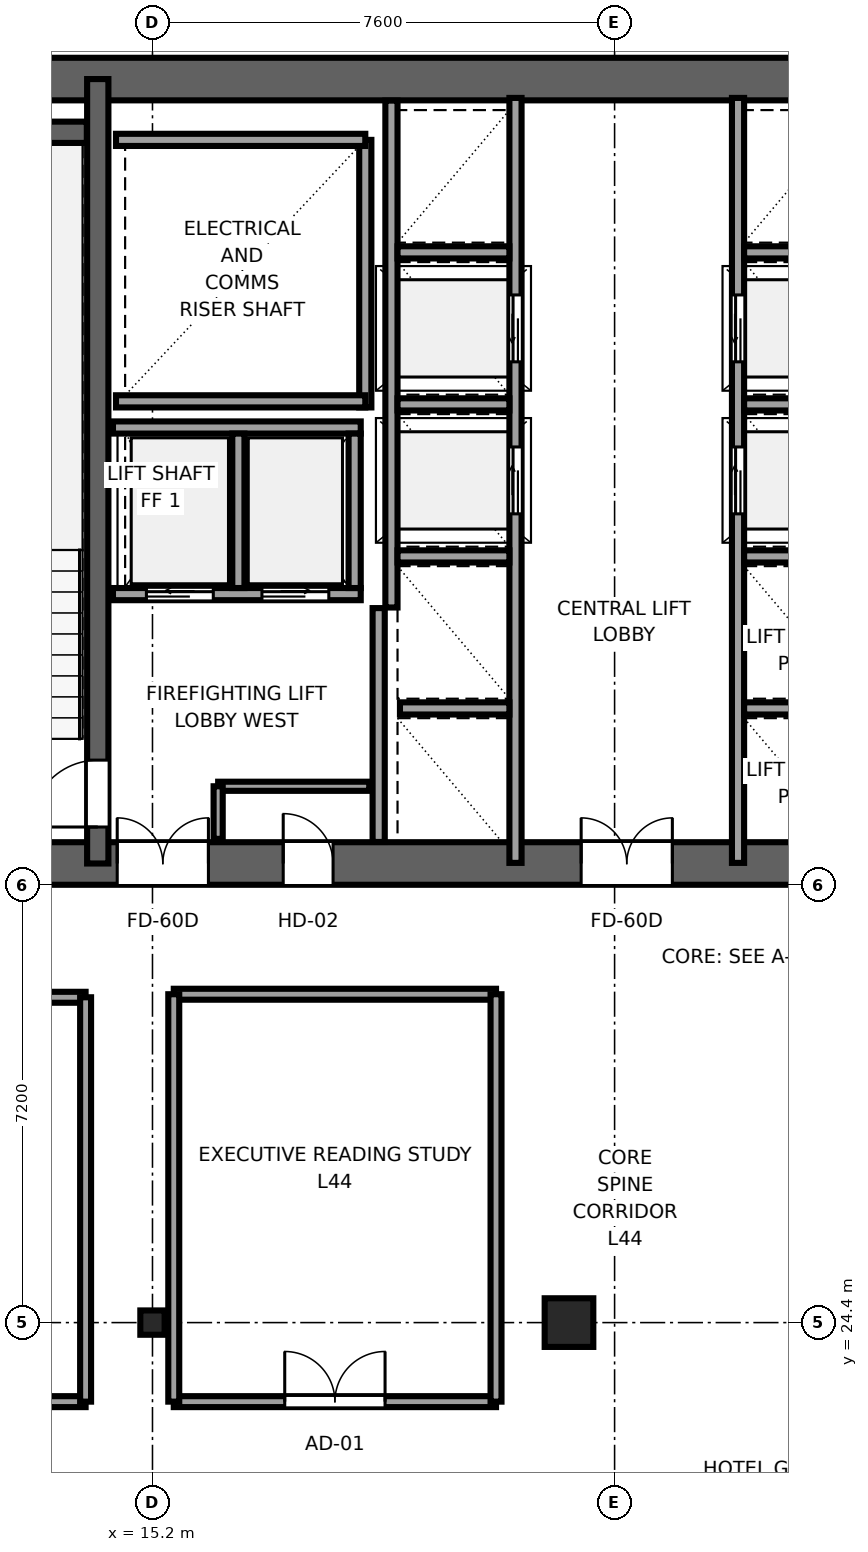
"""IFC4 building model, lengths in metres.
Left out: names, types, materials, properties, quantities, classifications, styles, units other than length and angle.
Written with IfcOpenShell. Run it as: python <this file> out.ifc"""

import sys

from ifc_helpers import new_model, si_unit, direction, frame, frame_2d, origin, origin_2d, place, context, subcontext, project, spatial, rectangle, i_section, extrude, source, transform, mapped, element, fill, save


model = new_model("IFC4")
c1 = context("Model", 3, precision=1e-05, world=origin(), true_north=direction((0.0, 1.0)))
c2 = subcontext(c1, "Body", "Model", "MODEL_VIEW")
j1 = project(units=[si_unit("LENGTHUNIT", "METRE"), si_unit("PLANEANGLEUNIT", "RADIAN")], contexts=[c1])
p1 = place(None, origin())
s1 = spatial("IfcSite", under=j1, at=p1, CompositionType="ELEMENT")
p2 = place(p1, origin())
s2 = spatial("IfcBuilding", under=s1, at=p2, CompositionType="ELEMENT")
p3 = place(p2, frame((0.0, 0.0, 168.35)))
s3 = spatial("IfcBuildingStorey", under=s2, at=p3, CompositionType="ELEMENT", Elevation=168.35)
p4 = place(p3, frame((9.8, 31.95, 0.0), z_axis=(0.0, 0.0, 1.0), x_axis=(1.0, 0.0, 0.0)))
e1 = element("IfcWall", 1, at=p4, inside=s3, PredefinedType="SHEAR", context=c2, shape_type="SweptSolid", body=[
    extrude(rectangle(XDim=26.4, YDim=0.7, at=frame_2d((13.2, 0.0))), origin(), (0.0, 0.0, 1.0), 3.55),
])
p5 = place(p4, frame((6.32, 0.0, 0.0), z_axis=(0.0, 0.0, 1.0), x_axis=(-1.0, 0.0, 0.0)))
e2 = element("IfcOpeningElement", 2, at=p5, cuts=e1, PredefinedType="OPENING", context=c2, shape_type="SweptSolid", body=[
    extrude(rectangle(XDim=1.5, YDim=2.04, at=frame_2d((0.75, 1.02))), frame((0.0, 0.36, 0.0), z_axis=(0.0, -1.0, 0.0), x_axis=(1.0, 0.0, 0.0)), (0.0, 0.0, 1.0), 0.72),
])
p6 = place(p4, frame((13.95, 0.0, 0.0), z_axis=(0.0, 0.0, 1.0), x_axis=(-1.0, 0.0, 0.0)))
e3 = element("IfcOpeningElement", 3, at=p6, cuts=e1, PredefinedType="OPENING", context=c2, shape_type="SweptSolid", body=[
    extrude(rectangle(XDim=1.5, YDim=2.04, at=frame_2d((0.75, 1.02))), frame((0.0, 0.36, 0.0), z_axis=(0.0, -1.0, 0.0), x_axis=(1.0, 0.0, 0.0)), (0.0, 0.0, 1.0), 0.72),
])
p7 = place(p4, frame((21.58, 0.0, 0.0), z_axis=(0.0, 0.0, 1.0), x_axis=(-1.0, 0.0, 0.0)))
e4 = element("IfcOpeningElement", 4, at=p7, cuts=e1, PredefinedType="OPENING", context=c2, shape_type="SweptSolid", body=[
    extrude(rectangle(XDim=1.5, YDim=2.04, at=frame_2d((0.75, 1.02))), frame((0.0, 0.36, 0.0), z_axis=(0.0, -1.0, 0.0), x_axis=(1.0, 0.0, 0.0)), (0.0, 0.0, 1.0), 0.72),
])
p8 = place(p4, frame((8.37, 0.0, 0.0), z_axis=(0.0, 0.0, 1.0), x_axis=(-1.0, 0.0, 0.0)))
e5 = element("IfcOpeningElement", 5, at=p8, cuts=e1, PredefinedType="OPENING", context=c2, shape_type="SweptSolid", body=[
    extrude(rectangle(XDim=0.82, YDim=2.01, at=frame_2d((0.41, 1.005))), frame((0.0, 0.36, 0.0), z_axis=(0.0, -1.0, 0.0), x_axis=(1.0, 0.0, 0.0)), (0.0, 0.0, 1.0), 0.72),
])
p9 = place(p4, frame((18.87, 0.0, 0.0), z_axis=(0.0, 0.0, 1.0), x_axis=(-1.0, 0.0, 0.0)))
e6 = element("IfcOpeningElement", 6, at=p9, cuts=e1, PredefinedType="OPENING", context=c2, shape_type="SweptSolid", body=[
    extrude(rectangle(XDim=0.82, YDim=2.01, at=frame_2d((0.41, 1.005))), frame((0.0, 0.36, 0.0), z_axis=(0.0, -1.0, 0.0), x_axis=(1.0, 0.0, 0.0)), (0.0, 0.0, 1.0), 0.72),
])
p10 = place(p3, frame((9.8, 44.85, 0.0), z_axis=(0.0, 0.0, 1.0), x_axis=(1.0, 0.0, 0.0)))
e7 = element("IfcWall", 7, at=p10, inside=s3, PredefinedType="SHEAR", context=c2, shape_type="SweptSolid", body=[
    extrude(rectangle(XDim=26.4, YDim=0.7, at=frame_2d((13.2, 0.0))), origin(), (0.0, 0.0, 1.0), 3.55),
])
p11 = place(p3, frame((14.3, 31.95, 0.0), z_axis=(0.0, 0.0, 1.0), x_axis=(0.0, 1.0, 0.0)))
e8 = element("IfcWall", 8, at=p11, inside=s3, PredefinedType="SHEAR", context=c2, shape_type="SweptSolid", body=[
    extrude(rectangle(XDim=12.9, YDim=0.35, at=frame_2d((6.45, 0.0))), origin(), (0.0, 0.0, 1.0), 3.55),
])
p12 = place(p11, frame((0.6, 0.0, 0.0)))
e9 = element("IfcOpeningElement", 9, at=p12, cuts=e8, PredefinedType="OPENING", context=c2, shape_type="SweptSolid", body=[
    extrude(rectangle(XDim=1.1, YDim=2.12, at=frame_2d((0.55, 1.06))), frame((0.0, 0.185, 0.0), z_axis=(0.0, -1.0, 0.0), x_axis=(1.0, 0.0, 0.0)), (0.0, 0.0, 1.0), 0.37),
])
p13 = place(p3, frame((10.52, 43.975, 0.0), z_axis=(0.0, 0.0, 1.0), x_axis=(1.0, 0.0, 0.0)))
e10 = element("IfcWall", 10, at=p13, inside=s3, PredefinedType="SHEAR", context=c2, shape_type="SweptSolid", body=[
    extrude(rectangle(XDim=3.6, YDim=0.35, at=frame_2d((1.8, 0.0))), origin(), (0.0, 0.0, 1.0), 3.55),
])
m1 = source(origin(), c2, "Body", "SweptSolid", [
    extrude(i_section(OverallWidth=0.4, OverallDepth=0.4, WebThickness=0.02, FlangeThickness=0.035, at=origin_2d()), origin(), (0.0, 0.0, 1.0), 3.55),
])
p14 = place(p3, frame((15.2, 24.4, 0.0), z_axis=(0.0, 0.0, 1.0), x_axis=(1.0, 0.0, 0.0)))
e11 = element("IfcColumn", 11, at=p14, inside=s3, PredefinedType="COLUMN", context=c2, shape_type="MappedRepresentation", body=[
    mapped(m1, transform((0.0, 0.0, 0.0), x_axis=(1.0, 0.0, 0.0), y_axis=(0.0, 1.0, 0.0), z_axis=(0.0, 0.0, 1.0), scale=1.0)),
])
m2 = source(origin(), c2, "Body", "SweptSolid", [
    extrude(rectangle(XDim=0.8, YDim=0.8, at=origin_2d()), origin(), (0.0, 0.0, 1.0), 3.55),
])
p15 = place(p3, frame((22.05, 24.4, 0.0), z_axis=(0.0, 0.0, 1.0), x_axis=(1.0, 0.0, 0.0)))
e12 = element("IfcColumn", 12, at=p15, inside=s3, PredefinedType="COLUMN", context=c2, shape_type="MappedRepresentation", body=[
    mapped(m2, transform((0.0, 0.0, 0.0), x_axis=(1.0, 0.0, 0.0), y_axis=(0.0, 1.0, 0.0), z_axis=(0.0, 0.0, 1.0), scale=1.0)),
])
p16 = place(p3, frame((18.7, 39.45, 0.0), z_axis=(0.0, 0.0, 1.0), x_axis=(0.0, 1.0, 0.0)))
e13 = element("IfcWall", 13, at=p16, inside=s3, PredefinedType="SOLIDWALL", context=c2, shape_type="SweptSolid", body=[
    extrude(rectangle(XDim=4.4, YDim=0.2, at=frame_2d((2.2, 0.0))), origin(), (0.0, 0.0, 1.0), 3.37),
])
for number, where, z_axis, x_axis in (
    (14, (14.6, 39.55, 0.0), (0.0, 0.0, 1.0), (1.0, 0.0, 0.0)),
    (15, (14.6, 43.85, 0.0), (0.0, 0.0, 1.0), (1.0, 0.0, 0.0)),
):
    element("IfcWall", number, at=place(p3, frame(where, z_axis=z_axis, x_axis=x_axis)), inside=s3, PredefinedType="SOLIDWALL", context=c2, shape_type="SweptSolid", body=[
        extrude(rectangle(XDim=4.1, YDim=0.2, at=frame_2d((2.05, 0.0))), origin(), (0.0, 0.0, 1.0), 3.37),
    ])
p17 = place(p3, frame((18.92, 32.304, 0.0), z_axis=(0.0, 0.0, 1.0), x_axis=(0.0, 1.0, 0.0)))
e16 = element("IfcWall", 16, at=p17, inside=s3, PredefinedType="SOLIDWALL", context=c2, shape_type="SweptSolid", body=[
    extrude(rectangle(XDim=3.846, YDim=0.2, at=frame_2d((1.923, 0.0))), origin(), (0.0, 0.0, 1.0), 3.37),
])
p18 = place(p3, frame((21.17, 31.96, 0.0), z_axis=(0.0, 0.0, 1.0), x_axis=(0.0, 1.0, 0.0)))
e17 = element("IfcWall", 17, at=p18, inside=s3, PredefinedType="SOLIDWALL", context=c2, shape_type="SweptSolid", body=[
    extrude(rectangle(XDim=12.58, YDim=0.2, at=frame_2d((6.29, 0.0))), origin(), (0.0, 0.0, 1.0), 3.37),
])
p19 = place(p18, frame((5.74, 0.0, 0.0)))
e18 = element("IfcOpeningElement", 18, at=p19, cuts=e17, PredefinedType="OPENING", context=c2, shape_type="SweptSolid", body=[
    extrude(rectangle(XDim=1.1, YDim=2.12, at=frame_2d((0.55, 1.06))), frame((0.0, 0.11, 0.0), z_axis=(0.0, -1.0, 0.0), x_axis=(1.0, 0.0, 0.0)), (0.0, 0.0, 1.0), 0.22),
])
p20 = place(p18, frame((8.24, 0.0, 0.0)))
e19 = element("IfcOpeningElement", 19, at=p20, cuts=e17, PredefinedType="OPENING", context=c2, shape_type="SweptSolid", body=[
    extrude(rectangle(XDim=1.1, YDim=2.12, at=frame_2d((0.55, 1.06))), frame((0.0, 0.11, 0.0), z_axis=(0.0, -1.0, 0.0), x_axis=(1.0, 0.0, 0.0)), (0.0, 0.0, 1.0), 0.22),
])
p21 = place(p3, frame((19.13, 36.16, 0.0), z_axis=(0.0, 0.0, 1.0), x_axis=(0.0, 1.0, 0.0)))
e20 = element("IfcWall", 20, at=p21, inside=s3, PredefinedType="SOLIDWALL", context=c2, shape_type="SweptSolid", body=[
    extrude(rectangle(XDim=8.336, YDim=0.2, at=frame_2d((4.168, 0.0))), origin(), (0.0, 0.0, 1.0), 3.37),
])
p22 = place(p3, frame((19.27, 34.5, 0.0), z_axis=(0.0, 0.0, 1.0), x_axis=(1.0, 0.0, 0.0)))
e21 = element("IfcWall", 21, at=p22, inside=s3, PredefinedType="SOLIDWALL", context=c2, shape_type="SweptSolid", body=[
    extrude(rectangle(XDim=1.8, YDim=0.2, at=frame_2d((0.9, 0.0))), origin(), (0.0, 0.0, 1.0), 3.37),
])
for number, where, z_axis, x_axis in (
    (22, (19.23, 37.0, 0.0), (0.0, 0.0, 1.0), (1.0, 0.0, 0.0)),
    (23, (19.23, 39.5, 0.0), (0.0, 0.0, 1.0), (1.0, 0.0, 0.0)),
    (24, (19.23, 42.0, 0.0), (0.0, 0.0, 1.0), (1.0, 0.0, 0.0)),
):
    element("IfcWall", number, at=place(p3, frame(where, z_axis=z_axis, x_axis=x_axis)), inside=s3, PredefinedType="SOLIDWALL", context=c2, shape_type="SweptSolid", body=[
        extrude(rectangle(XDim=1.84, YDim=0.2, at=frame_2d((0.92, 0.0))), origin(), (0.0, 0.0, 1.0), 3.37),
    ])
p23 = place(p3, frame((14.55, 36.38, 0.0), z_axis=(0.0, 0.0, 1.0), x_axis=(1.0, 0.0, 0.0)))
e25 = element("IfcWall", 25, at=p23, inside=s3, PredefinedType="SOLIDWALL", context=c2, shape_type="SweptSolid", body=[
    extrude(rectangle(XDim=4.075, YDim=0.2, at=frame_2d((2.038, 0.0))), origin(), (0.0, 0.0, 1.0), 3.37),
])
p24 = place(p23, frame((0.55, 0.0, 0.0)))
e26 = element("IfcOpeningElement", 26, at=p24, cuts=e25, PredefinedType="OPENING", context=c2, shape_type="SweptSolid", body=[
    extrude(rectangle(XDim=1.1, YDim=2.12, at=frame_2d((0.55, 1.06))), frame((0.0, 0.11, 0.0), z_axis=(0.0, -1.0, 0.0), x_axis=(1.0, 0.0, 0.0)), (0.0, 0.0, 1.0), 0.22),
])
p25 = place(p23, frame((2.45, 0.0, 0.0)))
e27 = element("IfcOpeningElement", 27, at=p25, cuts=e25, PredefinedType="OPENING", context=c2, shape_type="SweptSolid", body=[
    extrude(rectangle(XDim=1.1, YDim=2.12, at=frame_2d((0.55, 1.06))), frame((0.0, 0.11, 0.0), z_axis=(0.0, -1.0, 0.0), x_axis=(1.0, 0.0, 0.0)), (0.0, 0.0, 1.0), 0.22),
])
p26 = place(p3, frame((14.55, 39.12, 0.0), z_axis=(0.0, 0.0, 1.0), x_axis=(1.0, 0.0, 0.0)))
e28 = element("IfcWall", 28, at=p26, inside=s3, PredefinedType="SOLIDWALL", context=c2, shape_type="SweptSolid", body=[
    extrude(rectangle(XDim=4.075, YDim=0.2, at=frame_2d((2.038, 0.0))), origin(), (0.0, 0.0, 1.0), 3.37),
])
for number, where, z_axis, x_axis in (
    (29, (18.525, 36.48, 0.0), (0.0, 0.0, 1.0), (0.0, 1.0, 0.0)),
    (30, (16.613, 36.48, 0.0), (0.0, 0.0, 1.0), (0.0, 1.0, 0.0)),
):
    element("IfcWall", number, at=place(p3, frame(where, z_axis=z_axis, x_axis=x_axis)), inside=s3, PredefinedType="SOLIDWALL", context=c2, shape_type="SweptSolid", body=[
        extrude(rectangle(XDim=2.54, YDim=0.2, at=frame_2d((1.27, 0.0))), origin(), (0.0, 0.0, 1.0), 3.37),
    ])
p27 = place(p3, frame((24.83, 31.96, 0.0), z_axis=(0.0, 0.0, 1.0), x_axis=(0.0, 1.0, 0.0)))
e31 = element("IfcWall", 31, at=p27, inside=s3, PredefinedType="SOLIDWALL", context=c2, shape_type="SweptSolid", body=[
    extrude(rectangle(XDim=12.58, YDim=0.2, at=frame_2d((6.29, 0.0))), origin(), (0.0, 0.0, 1.0), 3.37),
])
p28 = place(p27, frame((5.74, 0.0, 0.0)))
e32 = element("IfcOpeningElement", 32, at=p28, cuts=e31, PredefinedType="OPENING", context=c2, shape_type="SweptSolid", body=[
    extrude(rectangle(XDim=1.1, YDim=2.12, at=frame_2d((0.55, 1.06))), frame((0.0, 0.11, 0.0), z_axis=(0.0, -1.0, 0.0), x_axis=(1.0, 0.0, 0.0)), (0.0, 0.0, 1.0), 0.22),
])
p29 = place(p27, frame((8.24, 0.0, 0.0)))
e33 = element("IfcOpeningElement", 33, at=p29, cuts=e31, PredefinedType="OPENING", context=c2, shape_type="SweptSolid", body=[
    extrude(rectangle(XDim=1.1, YDim=2.12, at=frame_2d((0.55, 1.06))), frame((0.0, 0.11, 0.0), z_axis=(0.0, -1.0, 0.0), x_axis=(1.0, 0.0, 0.0)), (0.0, 0.0, 1.0), 0.22),
])
p30 = place(p3, frame((24.93, 34.5, 0.0), z_axis=(0.0, 0.0, 1.0), x_axis=(1.0, 0.0, 0.0)))
e34 = element("IfcWall", 34, at=p30, inside=s3, PredefinedType="SOLIDWALL", context=c2, shape_type="SweptSolid", body=[
    extrude(rectangle(XDim=1.8, YDim=0.2, at=frame_2d((0.9, 0.0))), origin(), (0.0, 0.0, 1.0), 3.37),
])
for number, where, z_axis, x_axis in (
    (35, (24.93, 37.0, 0.0), (0.0, 0.0, 1.0), (1.0, 0.0, 0.0)),
    (36, (24.93, 39.5, 0.0), (0.0, 0.0, 1.0), (1.0, 0.0, 0.0)),
    (37, (24.93, 42.0, 0.0), (0.0, 0.0, 1.0), (1.0, 0.0, 0.0)),
):
    element("IfcWall", number, at=place(p3, frame(where, z_axis=z_axis, x_axis=x_axis)), inside=s3, PredefinedType="SOLIDWALL", context=c2, shape_type="SweptSolid", body=[
        extrude(rectangle(XDim=1.84, YDim=0.2, at=frame_2d((0.92, 0.0))), origin(), (0.0, 0.0, 1.0), 3.37),
    ])
p31 = place(p3, frame((16.28, 33.22, 0.0), z_axis=(0.0, 0.0, 1.0), x_axis=(1.0, 0.0, 0.0)))
e38 = element("IfcWall", 38, at=p31, inside=s3, PredefinedType="PARTITIONING", context=c2, shape_type="SweptSolid", body=[
    extrude(rectangle(XDim=2.485, YDim=0.15, at=frame_2d((1.242, 0.0))), origin(), (0.0, 0.0, 1.0), 3.37),
])
p32 = place(p3, frame((16.28, 32.355, 0.0), z_axis=(0.0, 0.0, 1.0), x_axis=(0.0, 1.0, 0.0)))
e39 = element("IfcWall", 39, at=p32, inside=s3, PredefinedType="PARTITIONING", context=c2, shape_type="SweptSolid", body=[
    extrude(rectangle(XDim=0.865, YDim=0.15, at=frame_2d((0.433, 0.0))), origin(), (0.0, 0.0, 1.0), 3.37),
])
p33 = place(p3, frame((9.88, 23.1, 0.0), z_axis=(0.0, 0.0, 1.0), x_axis=(1.0, 0.0, 0.0)))
e40 = element("IfcWall", 40, at=p33, inside=s3, PredefinedType="PARTITIONING", context=c2, shape_type="SweptSolid", body=[
    extrude(rectangle(XDim=4.22, YDim=0.18, at=frame_2d((2.11, 0.0))), origin(), (0.0, 0.0, 1.0), 3.37),
])
p34 = place(p33, frame((1.285, 0.0, 0.0)))
e41 = element("IfcOpeningElement", 41, at=p34, cuts=e40, PredefinedType="OPENING", context=c2, shape_type="SweptSolid", body=[
    extrude(rectangle(XDim=1.65, YDim=2.15, at=frame_2d((0.825, 1.075))), frame((0.0, 0.1, 0.0), z_axis=(0.0, -1.0, 0.0), x_axis=(1.0, 0.0, 0.0)), (0.0, 0.0, 1.0), 0.2),
])
p35 = place(p3, frame((9.88, 29.75, 0.0), z_axis=(0.0, 0.0, 1.0), x_axis=(1.0, 0.0, 0.0)))
e42 = element("IfcWall", 42, at=p35, inside=s3, PredefinedType="PARTITIONING", context=c2, shape_type="SweptSolid", body=[
    extrude(rectangle(XDim=4.22, YDim=0.18, at=frame_2d((2.11, 0.0))), origin(), (0.0, 0.0, 1.0), 3.37),
])
p36 = place(p3, frame((14.1, 23.1, 0.0), z_axis=(0.0, 0.0, 1.0), x_axis=(0.0, 1.0, 0.0)))
e43 = element("IfcWall", 43, at=p36, inside=s3, PredefinedType="PARTITIONING", context=c2, shape_type="SweptSolid", body=[
    extrude(rectangle(XDim=6.65, YDim=0.18, at=frame_2d((3.325, 0.0))), origin(), (0.0, 0.0, 1.0), 3.37),
])
p37 = place(p3, frame((15.55, 23.1, 0.0), z_axis=(0.0, 0.0, 1.0), x_axis=(1.0, 0.0, 0.0)))
e44 = element("IfcWall", 44, at=p37, inside=s3, PredefinedType="PARTITIONING", context=c2, shape_type="SweptSolid", body=[
    extrude(rectangle(XDim=5.3, YDim=0.18, at=frame_2d((2.65, 0.0))), origin(), (0.0, 0.0, 1.0), 3.37),
])
p38 = place(p37, frame((1.825, 0.0, 0.0)))
e45 = element("IfcOpeningElement", 45, at=p38, cuts=e44, PredefinedType="OPENING", context=c2, shape_type="SweptSolid", body=[
    extrude(rectangle(XDim=1.65, YDim=2.15, at=frame_2d((0.825, 1.075))), frame((0.0, 0.1, 0.0), z_axis=(0.0, -1.0, 0.0), x_axis=(1.0, 0.0, 0.0)), (0.0, 0.0, 1.0), 0.2),
])
p39 = place(p3, frame((15.55, 29.8, 0.0), z_axis=(0.0, 0.0, 1.0), x_axis=(1.0, 0.0, 0.0)))
e46 = element("IfcWall", 46, at=p39, inside=s3, PredefinedType="PARTITIONING", context=c2, shape_type="SweptSolid", body=[
    extrude(rectangle(XDim=5.3, YDim=0.18, at=frame_2d((2.65, 0.0))), origin(), (0.0, 0.0, 1.0), 3.37),
])
for number, where, z_axis, x_axis in (
    (47, (15.55, 23.1, 0.0), (0.0, 0.0, 1.0), (0.0, 1.0, 0.0)),
    (48, (20.85, 23.1, 0.0), (0.0, 0.0, 1.0), (0.0, 1.0, 0.0)),
):
    element("IfcWall", number, at=place(p3, frame(where, z_axis=z_axis, x_axis=x_axis)), inside=s3, PredefinedType="PARTITIONING", context=c2, shape_type="SweptSolid", body=[
        extrude(rectangle(XDim=6.7, YDim=0.18, at=frame_2d((3.35, 0.0))), origin(), (0.0, 0.0, 1.0), 3.37),
    ])
m3 = source(origin(), c2, "Body", "SweptSolid", [
    extrude(rectangle(XDim=1.1, YDim=2.12, at=frame_2d((0.55, 1.06))), frame((0.0, 0.025, 0.0), z_axis=(0.0, -1.0, 0.0), x_axis=(1.0, 0.0, 0.0)), (0.0, 0.0, 1.0), 0.05),
])
p40 = place(p12, origin())
e49 = element("IfcDoor", 49, at=p40, inside=s3, OperationType="SINGLE_SWING_LEFT", PredefinedType="DOOR", context=c2, shape_type="MappedRepresentation", body=[
    mapped(m3, transform((0.0, 0.0, 0.0), x_axis=(1.0, 0.0, 0.0), y_axis=(0.0, 1.0, 0.0), z_axis=(0.0, 0.0, 1.0), scale=1.0)),
])
fill(e9, e49)
m4 = source(origin(), c2, "Body", "SweptSolid", [
    extrude(rectangle(XDim=1.5, YDim=2.04, at=frame_2d((0.75, 1.02))), frame((0.0, 0.025, 0.0), z_axis=(0.0, -1.0, 0.0), x_axis=(1.0, 0.0, 0.0)), (0.0, 0.0, 1.0), 0.05),
])
p41 = place(p5, origin())
e50 = element("IfcDoor", 50, at=p41, inside=s3, OperationType="DOUBLE_DOOR_SINGLE_SWING", PredefinedType="DOOR", context=c2, shape_type="MappedRepresentation", body=[
    mapped(m4, transform((0.0, 0.0, 0.0), x_axis=(1.0, 0.0, 0.0), y_axis=(0.0, 1.0, 0.0), z_axis=(0.0, 0.0, 1.0), scale=1.0)),
])
fill(e2, e50)
p42 = place(p6, origin())
e51 = element("IfcDoor", 51, at=p42, inside=s3, OperationType="DOUBLE_DOOR_SINGLE_SWING", PredefinedType="DOOR", context=c2, shape_type="MappedRepresentation", body=[
    mapped(m4, transform((0.0, 0.0, 0.0), x_axis=(1.0, 0.0, 0.0), y_axis=(0.0, 1.0, 0.0), z_axis=(0.0, 0.0, 1.0), scale=1.0)),
])
fill(e3, e51)
m5 = source(origin(), c2, "Body", "SweptSolid", [
    extrude(rectangle(XDim=0.82, YDim=2.01, at=frame_2d((0.41, 1.005))), frame((0.0, 0.025, 0.0), z_axis=(0.0, -1.0, 0.0), x_axis=(1.0, 0.0, 0.0)), (0.0, 0.0, 1.0), 0.05),
])
p43 = place(p8, origin())
e52 = element("IfcDoor", 52, at=p43, inside=s3, OperationType="SINGLE_SWING_LEFT", PredefinedType="DOOR", context=c2, shape_type="MappedRepresentation", body=[
    mapped(m5, transform((0.0, 0.0, 0.0), x_axis=(1.0, 0.0, 0.0), y_axis=(0.0, 1.0, 0.0), z_axis=(0.0, 0.0, 1.0), scale=1.0)),
])
fill(e5, e52)
m6 = source(origin(), c2, "Body", "SweptSolid", [
    extrude(rectangle(XDim=1.1, YDim=2.12, at=frame_2d((0.55, 1.06))), frame((0.0, 0.025, 0.0), z_axis=(0.0, -1.0, 0.0), x_axis=(1.0, 0.0, 0.0)), (0.0, 0.0, 1.0), 0.05),
])
p44 = place(p19, origin())
e53 = element("IfcDoor", 53, at=p44, inside=s3, OperationType="SLIDING_TO_RIGHT", PredefinedType="DOOR", context=c2, shape_type="MappedRepresentation", body=[
    mapped(m6, transform((0.0, 0.0, 0.0), x_axis=(1.0, 0.0, 0.0), y_axis=(0.0, 1.0, 0.0), z_axis=(0.0, 0.0, 1.0), scale=1.0)),
])
fill(e18, e53)
p45 = place(p20, origin())
e54 = element("IfcDoor", 54, at=p45, inside=s3, OperationType="SLIDING_TO_LEFT", PredefinedType="DOOR", context=c2, shape_type="MappedRepresentation", body=[
    mapped(m6, transform((0.0, 0.0, 0.0), x_axis=(1.0, 0.0, 0.0), y_axis=(0.0, 1.0, 0.0), z_axis=(0.0, 0.0, 1.0), scale=1.0)),
])
fill(e19, e54)
p46 = place(p24, origin())
e55 = element("IfcDoor", 55, at=p46, inside=s3, OperationType="SLIDING_TO_LEFT", PredefinedType="DOOR", context=c2, shape_type="MappedRepresentation", body=[
    mapped(m6, transform((0.0, 0.0, 0.0), x_axis=(1.0, 0.0, 0.0), y_axis=(0.0, 1.0, 0.0), z_axis=(0.0, 0.0, 1.0), scale=1.0)),
])
fill(e26, e55)
p47 = place(p25, origin())
e56 = element("IfcDoor", 56, at=p47, inside=s3, OperationType="SLIDING_TO_RIGHT", PredefinedType="DOOR", context=c2, shape_type="MappedRepresentation", body=[
    mapped(m6, transform((0.0, 0.0, 0.0), x_axis=(1.0, 0.0, 0.0), y_axis=(0.0, 1.0, 0.0), z_axis=(0.0, 0.0, 1.0), scale=1.0)),
])
fill(e27, e56)
p48 = place(p28, origin())
e57 = element("IfcDoor", 57, at=p48, inside=s3, OperationType="SLIDING_TO_RIGHT", PredefinedType="DOOR", context=c2, shape_type="MappedRepresentation", body=[
    mapped(m6, transform((0.0, 0.0, 0.0), x_axis=(1.0, 0.0, 0.0), y_axis=(0.0, 1.0, 0.0), z_axis=(0.0, 0.0, 1.0), scale=1.0)),
])
fill(e32, e57)
p49 = place(p29, origin())
e58 = element("IfcDoor", 58, at=p49, inside=s3, OperationType="SLIDING_TO_LEFT", PredefinedType="DOOR", context=c2, shape_type="MappedRepresentation", body=[
    mapped(m6, transform((0.0, 0.0, 0.0), x_axis=(1.0, 0.0, 0.0), y_axis=(0.0, 1.0, 0.0), z_axis=(0.0, 0.0, 1.0), scale=1.0)),
])
fill(e33, e58)
m7 = source(origin(), c2, "Body", "SweptSolid", [
    extrude(rectangle(XDim=1.65, YDim=2.15, at=frame_2d((0.825, 1.075))), frame((0.0, 0.025, 0.0), z_axis=(0.0, -1.0, 0.0), x_axis=(1.0, 0.0, 0.0)), (0.0, 0.0, 1.0), 0.05),
])
p50 = place(p38, origin())
e59 = element("IfcDoor", 59, at=p50, inside=s3, OperationType="DOUBLE_DOOR_SINGLE_SWING", PredefinedType="DOOR", context=c2, shape_type="MappedRepresentation", body=[
    mapped(m7, transform((0.0, 0.0, 0.0), x_axis=(1.0, 0.0, 0.0), y_axis=(0.0, 1.0, 0.0), z_axis=(0.0, 0.0, 1.0), scale=1.0)),
])
fill(e45, e59)
save(model, sys.argv[1])
